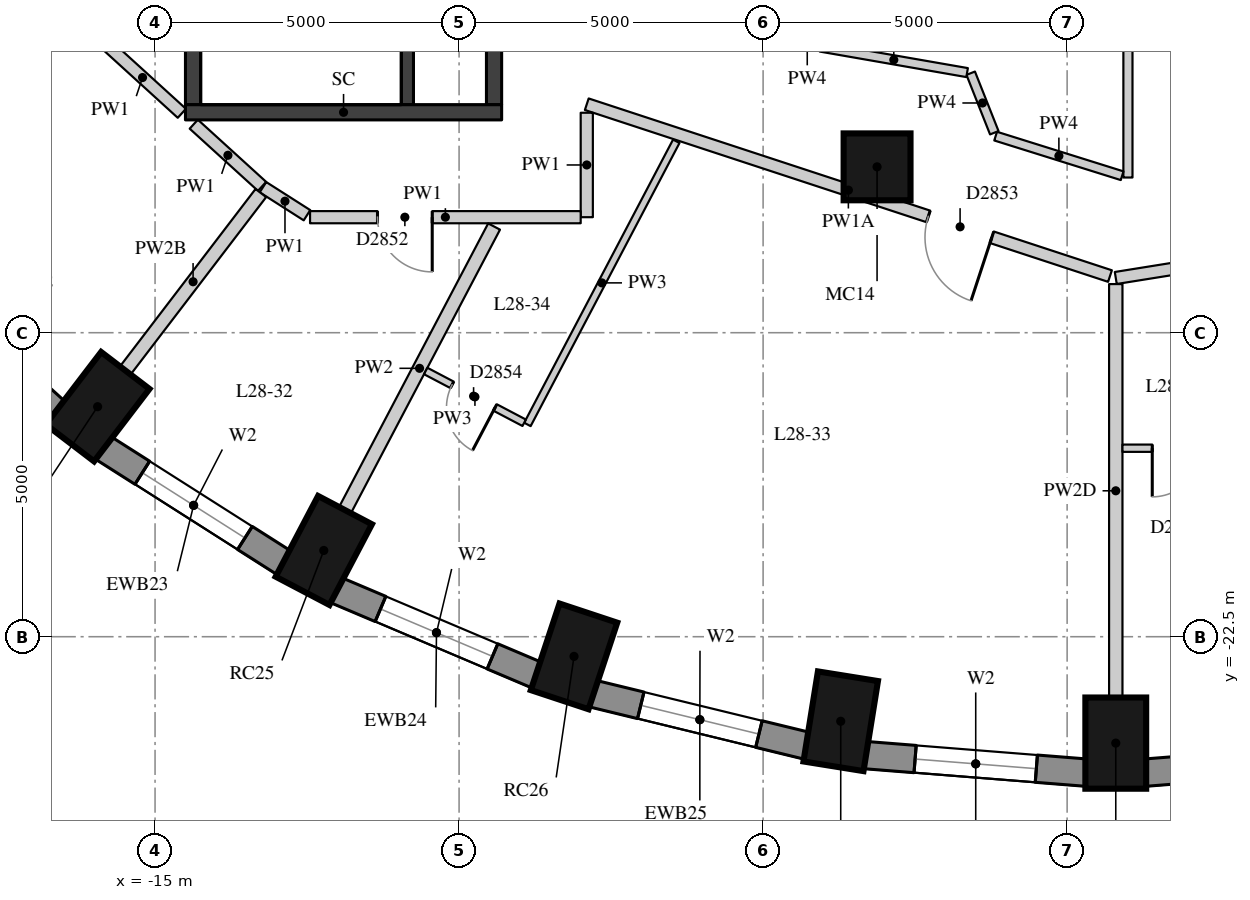
"""IFC4 building model, lengths in metres.
Left out: names, types, materials, properties, quantities, classifications, styles, units other than length and angle.
Written with IfcOpenShell. Run it as: python <this file> out.ifc"""

import sys

from ifc_helpers import new_model, si_unit, direction, frame, frame_2d, origin, origin_2d, place, context, subcontext, project, spatial, rectangle, extrude, element, fill, save


model = new_model("IFC4")
c1 = context("Model", 3, precision=1e-05, world=origin(), true_north=direction((0.0, 1.0)))
c2 = subcontext(c1, "Body", "Model", "MODEL_VIEW")
j1 = project(units=[si_unit("LENGTHUNIT", "METRE"), si_unit("PLANEANGLEUNIT", "RADIAN")], contexts=[c1])
p1 = place(None, origin())
s1 = spatial("IfcSite", under=j1, at=p1, CompositionType="ELEMENT")
p2 = place(p1, origin())
s2 = spatial("IfcBuilding", under=s1, at=p2, CompositionType="ELEMENT")
p3 = place(p2, frame((0.0, 0.0, 102.1)))
s3 = spatial("IfcBuildingStorey", under=s2, at=p3, CompositionType="ELEMENT", Elevation=102.1)
for number, where, z_axis, x_axis in (
    (1, (-15.945, -18.717, 0.0), (0.0, 0.0, 1.0), (-0.607, -0.795, 0.0)),
    (2, (-12.225, -21.082, 0.0), (0.0, 0.0, 1.0), (-0.465, -0.885, 0.0)),
    (3, (-8.11, -22.824, 0.0), (0.0, 0.0, 1.0), (-0.315, -0.949, 0.0)),
    (4, (-3.724, -23.891, 0.0), (0.0, 0.0, 1.0), (-0.159, -0.987, 0.0)),
    (5, (0.8, -24.25, 0.0), (0.0, 0.0, 1.0), (0.0, -1.0, 0.0)),
):
    element("IfcColumn", number, at=place(p3, frame(where, z_axis=z_axis, x_axis=x_axis)), inside=s3, PredefinedType="COLUMN", context=c2, shape_type="SweptSolid", body=[
        extrude(rectangle(XDim=1.5, YDim=1.0, at=origin_2d()), origin(), (0.0, 0.0, 1.0), 3.3),
    ])
p4 = place(p3, frame((-3.126, -14.772, 0.0), z_axis=(0.0, 0.0, 1.0), x_axis=(1.0, 0.0, 0.0)))
e6 = element("IfcColumn", 6, at=p4, inside=s3, PredefinedType="COLUMN", context=c2, shape_type="SweptSolid", body=[
    extrude(rectangle(XDim=1.1, YDim=1.1, at=origin_2d()), origin(), (0.0, 0.0, 1.0), 3.3),
])
p5 = place(p3, frame((-19.184, -16.481, 0.0), z_axis=(0.0, 0.0, 1.0), x_axis=(0.740364106106, -0.672206062446, 0.0)))
e7 = element("IfcWall", 7, at=p5, inside=s3, PredefinedType="SOLIDWALL", context=c2, shape_type="SweptSolid", body=[
    extrude(rectangle(XDim=3.464, YDim=0.45, at=frame_2d((1.732, 0.0))), origin(), (0.0, 0.0, 1.0), 3.02),
])
p6 = place(p5, frame((0.732, 0.0, 0.4)))
e8 = element("IfcOpeningElement", 8, at=p6, cuts=e7, PredefinedType="OPENING", context=c2, shape_type="SweptSolid", body=[
    extrude(rectangle(XDim=2.0, YDim=1.75, at=frame_2d((1.0, 0.875))), frame((0.0, 0.235, 0.0), z_axis=(0.0, -1.0, 0.0), x_axis=(1.0, 0.0, 0.0)), (0.0, 0.0, 1.0), 0.47),
])
p7 = place(p3, frame((-15.856, -19.392, 0.0), z_axis=(0.0, 0.0, 1.0), x_axis=(0.843891947083, -0.53651317006, 0.0)))
e9 = element("IfcWall", 9, at=p7, inside=s3, PredefinedType="SOLIDWALL", context=c2, shape_type="SweptSolid", body=[
    extrude(rectangle(XDim=3.532, YDim=0.45, at=frame_2d((1.766, 0.0))), origin(), (0.0, 0.0, 1.0), 3.02),
])
p8 = place(p7, frame((0.766, 0.0, 0.4)))
e10 = element("IfcOpeningElement", 10, at=p8, cuts=e9, PredefinedType="OPENING", context=c2, shape_type="SweptSolid", body=[
    extrude(rectangle(XDim=2.0, YDim=1.75, at=frame_2d((1.0, 0.875))), frame((0.0, 0.235, 0.0), z_axis=(0.0, -1.0, 0.0), x_axis=(1.0, 0.0, 0.0)), (0.0, 0.0, 1.0), 0.47),
])
p9 = place(p3, frame((-12.025, -21.733, 0.0), z_axis=(0.0, 0.0, 1.0), x_axis=(0.920879975612, -0.389846213932, 0.0)))
e11 = element("IfcWall", 11, at=p9, inside=s3, PredefinedType="SOLIDWALL", context=c2, shape_type="SweptSolid", body=[
    extrude(rectangle(XDim=3.592, YDim=0.45, at=frame_2d((1.796, 0.0))), origin(), (0.0, 0.0, 1.0), 3.02),
])
p10 = place(p9, frame((0.796, 0.0, 0.4)))
e12 = element("IfcOpeningElement", 12, at=p10, cuts=e11, PredefinedType="OPENING", context=c2, shape_type="SweptSolid", body=[
    extrude(rectangle(XDim=2.0, YDim=1.75, at=frame_2d((1.0, 0.875))), frame((0.0, 0.235, 0.0), z_axis=(0.0, -1.0, 0.0), x_axis=(1.0, 0.0, 0.0)), (0.0, 0.0, 1.0), 0.47),
])
p11 = place(p3, frame((-7.807, -23.435, 0.0), z_axis=(0.0, 0.0, 1.0), x_axis=(0.971667603162, -0.236351579148, 0.0)))
e13 = element("IfcWall", 13, at=p11, inside=s3, PredefinedType="SOLIDWALL", context=c2, shape_type="SweptSolid", body=[
    extrude(rectangle(XDim=3.635, YDim=0.45, at=frame_2d((1.817, 0.0))), origin(), (0.0, 0.0, 1.0), 3.02),
])
p12 = place(p11, frame((0.817, 0.0, 0.4)))
e14 = element("IfcOpeningElement", 14, at=p12, cuts=e13, PredefinedType="OPENING", context=c2, shape_type="SweptSolid", body=[
    extrude(rectangle(XDim=2.0, YDim=1.75, at=frame_2d((1.0, 0.875))), frame((0.0, 0.235, 0.0), z_axis=(0.0, -1.0, 0.0), x_axis=(1.0, 0.0, 0.0)), (0.0, 0.0, 1.0), 0.47),
])
p13 = place(p3, frame((-3.327, -24.447, 0.0), z_axis=(0.0, 0.0, 1.0), x_axis=(0.996862216754, -0.079156306178, 0.0)))
e15 = element("IfcWall", 15, at=p13, inside=s3, PredefinedType="SOLIDWALL", context=c2, shape_type="SweptSolid", body=[
    extrude(rectangle(XDim=3.658, YDim=0.45, at=frame_2d((1.829, 0.0))), origin(), (0.0, 0.0, 1.0), 3.02),
])
p14 = place(p13, frame((0.829, 0.0, 0.4)))
e16 = element("IfcOpeningElement", 16, at=p14, cuts=e15, PredefinedType="OPENING", context=c2, shape_type="SweptSolid", body=[
    extrude(rectangle(XDim=2.0, YDim=1.75, at=frame_2d((1.0, 0.875))), frame((0.0, 0.235, 0.0), z_axis=(0.0, -1.0, 0.0), x_axis=(1.0, 0.0, 0.0)), (0.0, 0.0, 1.0), 0.47),
])
p15 = place(p3, frame((1.28, -24.736, 0.0), z_axis=(0.0, 0.0, 1.0), x_axis=(0.996862216754, 0.079156306178, 0.0)))
e17 = element("IfcWall", 17, at=p15, inside=s3, PredefinedType="SOLIDWALL", context=c2, shape_type="SweptSolid", body=[
    extrude(rectangle(XDim=3.658, YDim=0.45, at=frame_2d((1.829, 0.0))), origin(), (0.0, 0.0, 1.0), 3.02),
])
p16 = place(p15, frame((0.829, 0.0, 0.4)))
e18 = element("IfcOpeningElement", 18, at=p16, cuts=e17, PredefinedType="OPENING", context=c2, shape_type="SweptSolid", body=[
    extrude(rectangle(XDim=2.0, YDim=1.75, at=frame_2d((1.0, 0.875))), frame((0.0, 0.235, 0.0), z_axis=(0.0, -1.0, 0.0), x_axis=(1.0, 0.0, 0.0)), (0.0, 0.0, 1.0), 0.47),
])
p17 = place(p3, frame((-10.85, -13.75, 0.0), z_axis=(0.0, 0.0, 1.0), x_axis=(0.0, 1.0, 0.0)))
e19 = element("IfcWall", 19, at=p17, inside=s3, PredefinedType="SHEAR", context=c2, shape_type="SweptSolid", body=[
    extrude(rectangle(XDim=6.0, YDim=0.2, at=frame_2d((3.0, 0.0))), origin(), (0.0, 0.0, 1.0), 3.02),
])
p18 = place(p17, frame((4.4, 0.0, 0.0)))
e20 = element("IfcOpeningElement", 20, at=p18, cuts=e19, PredefinedType="OPENING", context=c2, shape_type="SweptSolid", body=[
    extrude(rectangle(XDim=1.5, YDim=2.1, at=frame_2d((0.75, 1.05))), frame((0.0, 0.11, 0.0), z_axis=(0.0, -1.0, 0.0), x_axis=(1.0, 0.0, 0.0)), (0.0, 0.0, 1.0), 0.22),
])
p19 = place(p3, frame((-14.375, -13.75, -0.28), z_axis=(0.0, 0.0, 1.0), x_axis=(0.0, 1.0, 0.0)))
e21 = element("IfcWall", 21, at=p19, inside=s3, PredefinedType="SHEAR", context=c2, shape_type="SweptSolid", body=[
    extrude(rectangle(XDim=6.0, YDim=0.25, at=frame_2d((3.0, 0.0))), origin(), (0.0, 0.0, 1.0), 3.3),
])
p20 = place(p3, frame((-9.425, -13.75, -0.28), z_axis=(0.0, 0.0, 1.0), x_axis=(0.0, 1.0, 0.0)))
e22 = element("IfcWall", 22, at=p20, inside=s3, PredefinedType="SHEAR", context=c2, shape_type="SweptSolid", body=[
    extrude(rectangle(XDim=6.0, YDim=0.25, at=frame_2d((3.0, 0.0))), origin(), (0.0, 0.0, 1.0), 3.3),
])
p21 = place(p20, frame((2.4, 0.0, 0.28)))
e23 = element("IfcOpeningElement", 23, at=p21, cuts=e22, PredefinedType="OPENING", context=c2, shape_type="SweptSolid", body=[
    extrude(rectangle(XDim=1.5, YDim=2.1, at=frame_2d((0.75, 1.05))), frame((0.0, 0.135, 0.0), z_axis=(0.0, -1.0, 0.0), x_axis=(1.0, 0.0, 0.0)), (0.0, 0.0, 1.0), 0.27),
])
p22 = place(p3, frame((-14.5, -13.875, -0.28), z_axis=(0.0, 0.0, 1.0), x_axis=(1.0, 0.0, 0.0)))
e24 = element("IfcWall", 24, at=p22, inside=s3, PredefinedType="SHEAR", context=c2, shape_type="SweptSolid", body=[
    extrude(rectangle(XDim=5.2, YDim=0.25, at=frame_2d((2.6, 0.0))), origin(), (0.0, 0.0, 1.0), 3.3),
])
p23 = place(p3, frame((-14.56, -13.891, 0.0), z_axis=(0.0, 0.0, 1.0), x_axis=(-0.739440483737, 0.673221932954, 0.0)))
e25 = element("IfcWall", 25, at=p23, inside=s3, PredefinedType="PARTITIONING", context=c2, shape_type="SweptSolid", body=[
    extrude(rectangle(XDim=1.748, YDim=0.2, at=frame_2d((0.874, 0.0))), origin(), (0.0, 0.0, 1.0), 3.02),
])
p24 = place(p3, frame((7.284, -15.561, 0.0), z_axis=(0.0, 0.0, 1.0), x_axis=(-0.987409293733, -0.158186240393, 0.0)))
e26 = element("IfcWall", 26, at=p24, inside=s3, PredefinedType="PARTITIONING", context=c2, shape_type="SweptSolid", body=[
    extrude(rectangle(XDim=6.567, YDim=0.2, at=frame_2d((3.284, 0.0))), origin(), (0.0, 0.0, 1.0), 3.02),
])
p25 = place(p24, frame((2.057, 0.0, 0.0)))
e27 = element("IfcOpeningElement", 27, at=p25, cuts=e26, PredefinedType="OPENING", context=c2, shape_type="SweptSolid", body=[
    extrude(rectangle(XDim=1.1, YDim=2.1, at=frame_2d((0.55, 1.05))), frame((0.0, 0.11, 0.0), z_axis=(0.0, -1.0, 0.0), x_axis=(1.0, 0.0, 0.0)), (0.0, 0.0, 1.0), 0.22),
])
p26 = place(p3, frame((0.705, -16.568, 0.0), z_axis=(0.0, 0.0, 1.0), x_axis=(-0.950067715644, 0.312043804122, 0.0)))
e28 = element("IfcWall", 28, at=p26, inside=s3, PredefinedType="PARTITIONING", context=c2, shape_type="SweptSolid", body=[
    extrude(rectangle(XDim=9.057, YDim=0.2, at=frame_2d((4.528, 0.0))), origin(), (0.0, 0.0, 1.0), 2.57),
])
p27 = place(p26, frame((2.045, 0.0, 0.0)))
e29 = element("IfcOpeningElement", 29, at=p27, cuts=e28, PredefinedType="OPENING", context=c2, shape_type="SweptSolid", body=[
    extrude(rectangle(XDim=1.1, YDim=2.1, at=frame_2d((0.55, 1.05))), frame((0.0, 0.11, 0.0), z_axis=(0.0, -1.0, 0.0), x_axis=(1.0, 0.0, 0.0)), (0.0, 0.0, 1.0), 0.22),
])
p28 = place(p3, frame((-7.9, -13.882, 0.0), z_axis=(0.0, 0.0, 1.0), x_axis=(0.0, -1.0, 0.0)))
e30 = element("IfcWall", 30, at=p28, inside=s3, PredefinedType="PARTITIONING", context=c2, shape_type="SweptSolid", body=[
    extrude(rectangle(XDim=1.718, YDim=0.2, at=frame_2d((0.859, 0.0))), origin(), (0.0, 0.0, 1.0), 3.02),
])
p29 = place(p3, frame((-8.0, -15.6, 0.0), z_axis=(0.0, 0.0, 1.0), x_axis=(-1.0, 0.0, 0.0)))
e31 = element("IfcWall", 31, at=p29, inside=s3, PredefinedType="PARTITIONING", context=c2, shape_type="SweptSolid", body=[
    extrude(rectangle(XDim=4.451, YDim=0.2, at=frame_2d((2.226, 0.0))), origin(), (0.0, 0.0, 1.0), 3.02),
])
p30 = place(p29, frame((2.442, 0.0, 0.0)))
e32 = element("IfcOpeningElement", 32, at=p30, cuts=e31, PredefinedType="OPENING", context=c2, shape_type="SweptSolid", body=[
    extrude(rectangle(XDim=0.9, YDim=2.1, at=frame_2d((0.45, 1.05))), frame((0.0, 0.11, 0.0), z_axis=(0.0, -1.0, 0.0), x_axis=(1.0, 0.0, 0.0)), (0.0, 0.0, 1.0), 0.22),
])
p31 = place(p3, frame((-12.501, -15.568, 0.0), z_axis=(0.0, 0.0, 1.0), x_axis=(-0.843169167706, 0.537648355926, 0.0)))
e33 = element("IfcWall", 33, at=p31, inside=s3, PredefinedType="PARTITIONING", context=c2, shape_type="SweptSolid", body=[
    extrude(rectangle(XDim=0.858, YDim=0.2, at=frame_2d((0.429, 0.0))), origin(), (0.0, 0.0, 1.0), 3.02),
])
p32 = place(p3, frame((-13.24, -15.093, 0.0), z_axis=(0.0, 0.0, 1.0), x_axis=(-0.739438095557, 0.673224556028, 0.0)))
e34 = element("IfcWall", 34, at=p32, inside=s3, PredefinedType="PARTITIONING", context=c2, shape_type="SweptSolid", body=[
    extrude(rectangle(XDim=1.519, YDim=0.2, at=frame_2d((0.76, 0.0))), origin(), (0.0, 0.0, 1.0), 3.02),
])
p33 = place(p3, frame((1.0, -9.23, 0.0), z_axis=(0.0, 0.0, 1.0), x_axis=(0.0, -1.0, 0.0)))
e35 = element("IfcWall", 35, at=p33, inside=s3, PredefinedType="PARTITIONING", context=c2, shape_type="SweptSolid", body=[
    extrude(rectangle(XDim=5.718, YDim=0.15, at=frame_2d((2.859, 0.0))), origin(), (0.0, 0.0, 1.0), 3.02),
])
p34 = place(p3, frame((0.905, -14.918, 0.0), z_axis=(0.0, 0.0, 1.0), x_axis=(-0.954324426349, 0.298772303391, 0.0)))
e36 = element("IfcWall", 36, at=p34, inside=s3, PredefinedType="PARTITIONING", context=c2, shape_type="SweptSolid", body=[
    extrude(rectangle(XDim=2.18, YDim=0.15, at=frame_2d((1.09, 0.0))), origin(), (0.0, 0.0, 1.0), 3.02),
])
p35 = place(p3, frame((-1.198, -14.211, 0.0), z_axis=(0.0, 0.0, 1.0), x_axis=(-0.368390833177, 0.929671013871, 0.0)))
e37 = element("IfcWall", 37, at=p35, inside=s3, PredefinedType="PARTITIONING", context=c2, shape_type="SweptSolid", body=[
    extrude(rectangle(XDim=1.053, YDim=0.15, at=frame_2d((0.526, 0.0))), origin(), (0.0, 0.0, 1.0), 3.02),
])
p36 = place(p3, frame((-1.645, -13.222, 0.0), z_axis=(0.0, 0.0, 1.0), x_axis=(-0.985187584004, 0.171480098917, 0.0)))
e38 = element("IfcWall", 38, at=p36, inside=s3, PredefinedType="PARTITIONING", context=c2, shape_type="SweptSolid", body=[
    extrude(rectangle(XDim=2.447, YDim=0.15, at=frame_2d((1.224, 0.0))), origin(), (0.0, 0.0, 1.0), 3.02),
])
p37 = place(p3, frame((-15.489, -18.121, 0.0), z_axis=(0.0, 0.0, 1.0), x_axis=(0.607082337972, 0.794638933681, 0.0)))
e39 = element("IfcWall", 39, at=p37, inside=s3, PredefinedType="PARTITIONING", context=c2, shape_type="SweptSolid", body=[
    extrude(rectangle(XDim=3.672, YDim=0.22, at=frame_2d((1.836, 0.0))), origin(), (0.0, 0.0, 1.0), 2.57),
])
p38 = place(p3, frame((-11.876, -20.418, 0.0), z_axis=(0.0, 0.0, 1.0), x_axis=(0.465320539057, 0.885142246157, 0.0)))
e40 = element("IfcWall", 40, at=p38, inside=s3, PredefinedType="PARTITIONING", context=c2, shape_type="SweptSolid", body=[
    extrude(rectangle(XDim=5.269, YDim=0.22, at=frame_2d((2.635, 0.0))), origin(), (0.0, 0.0, 1.0), 3.02),
])
p39 = place(p3, frame((0.8, -23.5, 0.0), z_axis=(0.0, 0.0, 1.0), x_axis=(0.0, 1.0, 0.0)))
e41 = element("IfcWall", 41, at=p39, inside=s3, PredefinedType="PARTITIONING", context=c2, shape_type="SweptSolid", body=[
    extrude(rectangle(XDim=6.8, YDim=0.22, at=frame_2d((3.4, 0.0))), origin(), (0.0, 0.0, 1.0), 2.47),
])
p40 = place(p3, frame((-6.428, -14.352, 0.0), z_axis=(0.0, 0.0, 1.0), x_axis=(-0.46531034676, -0.885147604187, 0.0)))
e42 = element("IfcWall", 42, at=p40, inside=s3, PredefinedType="PARTITIONING", context=c2, shape_type="SweptSolid", body=[
    extrude(rectangle(XDim=5.261, YDim=0.12, at=frame_2d((2.631, 0.0))), origin(), (0.0, 0.0, 1.0), 3.02),
])
p41 = place(p3, frame((-8.929, -18.981, 0.0), z_axis=(0.0, 0.0, 1.0), x_axis=(-0.885114946598, 0.465372465139, 0.0)))
e43 = element("IfcWall", 43, at=p41, inside=s3, PredefinedType="PARTITIONING", context=c2, shape_type="SweptSolid", body=[
    extrude(rectangle(XDim=1.83, YDim=0.12, at=frame_2d((0.915, 0.0))), origin(), (0.0, 0.0, 1.0), 3.02),
])
p42 = place(p41, frame((0.54, 0.0, 0.0)))
e44 = element("IfcOpeningElement", 44, at=p42, cuts=e43, PredefinedType="OPENING", context=c2, shape_type="SweptSolid", body=[
    extrude(rectangle(XDim=0.8, YDim=2.1, at=frame_2d((0.4, 1.05))), frame((0.0, 0.07, 0.0), z_axis=(0.0, -1.0, 0.0), x_axis=(1.0, 0.0, 0.0)), (0.0, 0.0, 1.0), 0.14),
])
p43 = place(p3, frame((2.74, -19.4, 0.0), z_axis=(0.0, 0.0, 1.0), x_axis=(-1.0, 0.0, 0.0)))
e45 = element("IfcWall", 45, at=p43, inside=s3, PredefinedType="PARTITIONING", context=c2, shape_type="SweptSolid", body=[
    extrude(rectangle(XDim=1.83, YDim=0.12, at=frame_2d((0.915, 0.0))), origin(), (0.0, 0.0, 1.0), 3.02),
])
p44 = place(p43, frame((0.54, 0.0, 0.0)))
e46 = element("IfcOpeningElement", 46, at=p44, cuts=e45, PredefinedType="OPENING", context=c2, shape_type="SweptSolid", body=[
    extrude(rectangle(XDim=0.8, YDim=2.1, at=frame_2d((0.4, 1.05))), frame((0.0, 0.07, 0.0), z_axis=(0.0, -1.0, 0.0), x_axis=(1.0, 0.0, 0.0)), (0.0, 0.0, 1.0), 0.14),
])
p45 = place(p8, origin())
e47 = element("IfcWindow", 47, at=p45, inside=s3, PartitioningType="SINGLE_PANEL", PredefinedType="WINDOW", context=c2, shape_type="SweptSolid", body=[
    extrude(rectangle(XDim=2.0, YDim=1.75, at=frame_2d((1.0, 0.875))), frame((0.0, 0.035, 0.0), z_axis=(0.0, -1.0, 0.0), x_axis=(1.0, 0.0, 0.0)), (0.0, 0.0, 1.0), 0.06),
])
fill(e10, e47)
p46 = place(p10, origin())
e48 = element("IfcWindow", 48, at=p46, inside=s3, PartitioningType="SINGLE_PANEL", PredefinedType="WINDOW", context=c2, shape_type="SweptSolid", body=[
    extrude(rectangle(XDim=2.0, YDim=1.75, at=frame_2d((1.0, 0.875))), frame((0.0, 0.035, 0.0), z_axis=(0.0, -1.0, 0.0), x_axis=(1.0, 0.0, 0.0)), (0.0, 0.0, 1.0), 0.06),
])
fill(e12, e48)
p47 = place(p12, origin())
e49 = element("IfcWindow", 49, at=p47, inside=s3, PartitioningType="SINGLE_PANEL", PredefinedType="WINDOW", context=c2, shape_type="SweptSolid", body=[
    extrude(rectangle(XDim=2.0, YDim=1.75, at=frame_2d((1.0, 0.875))), frame((0.0, 0.035, 0.0), z_axis=(0.0, -1.0, 0.0), x_axis=(1.0, 0.0, 0.0)), (0.0, 0.0, 1.0), 0.06),
])
fill(e14, e49)
p48 = place(p14, origin())
e50 = element("IfcWindow", 50, at=p48, inside=s3, PartitioningType="SINGLE_PANEL", PredefinedType="WINDOW", context=c2, shape_type="SweptSolid", body=[
    extrude(rectangle(XDim=2.0, YDim=1.75, at=frame_2d((1.0, 0.875))), frame((0.0, 0.035, 0.0), z_axis=(0.0, -1.0, 0.0), x_axis=(1.0, 0.0, 0.0)), (0.0, 0.0, 1.0), 0.06),
])
fill(e16, e50)
p49 = place(p30, origin())
e51 = element("IfcDoor", 51, at=p49, inside=s3, OperationType="SINGLE_SWING_LEFT", PredefinedType="DOOR", context=c2, shape_type="SweptSolid", body=[
    extrude(rectangle(XDim=0.9, YDim=2.1, at=frame_2d((0.45, 1.05))), frame((0.0, 0.025, 0.0), z_axis=(0.0, -1.0, 0.0), x_axis=(1.0, 0.0, 0.0)), (0.0, 0.0, 1.0), 0.05),
])
fill(e32, e51)
p50 = place(p27, origin())
e52 = element("IfcDoor", 52, at=p50, inside=s3, OperationType="SINGLE_SWING_LEFT", PredefinedType="DOOR", context=c2, shape_type="SweptSolid", body=[
    extrude(rectangle(XDim=1.1, YDim=2.1, at=frame_2d((0.55, 1.05))), frame((0.0, 0.025, 0.0), z_axis=(0.0, -1.0, 0.0), x_axis=(1.0, 0.0, 0.0)), (0.0, 0.0, 1.0), 0.05),
])
fill(e29, e52)
p51 = place(p42, origin())
e53 = element("IfcDoor", 53, at=p51, inside=s3, OperationType="SINGLE_SWING_LEFT", PredefinedType="DOOR", context=c2, shape_type="SweptSolid", body=[
    extrude(rectangle(XDim=0.8, YDim=2.1, at=frame_2d((0.4, 1.05))), frame((0.0, 0.025, 0.0), z_axis=(0.0, -1.0, 0.0), x_axis=(1.0, 0.0, 0.0)), (0.0, 0.0, 1.0), 0.05),
])
fill(e44, e53)
p52 = place(p44, origin())
e54 = element("IfcDoor", 54, at=p52, inside=s3, OperationType="SINGLE_SWING_RIGHT", PredefinedType="DOOR", context=c2, shape_type="SweptSolid", body=[
    extrude(rectangle(XDim=0.8, YDim=2.1, at=frame_2d((0.4, 1.05))), frame((0.0, 0.025, 0.0), z_axis=(0.0, -1.0, 0.0), x_axis=(1.0, 0.0, 0.0)), (0.0, 0.0, 1.0), 0.05),
])
fill(e46, e54)
save(model, sys.argv[1])
